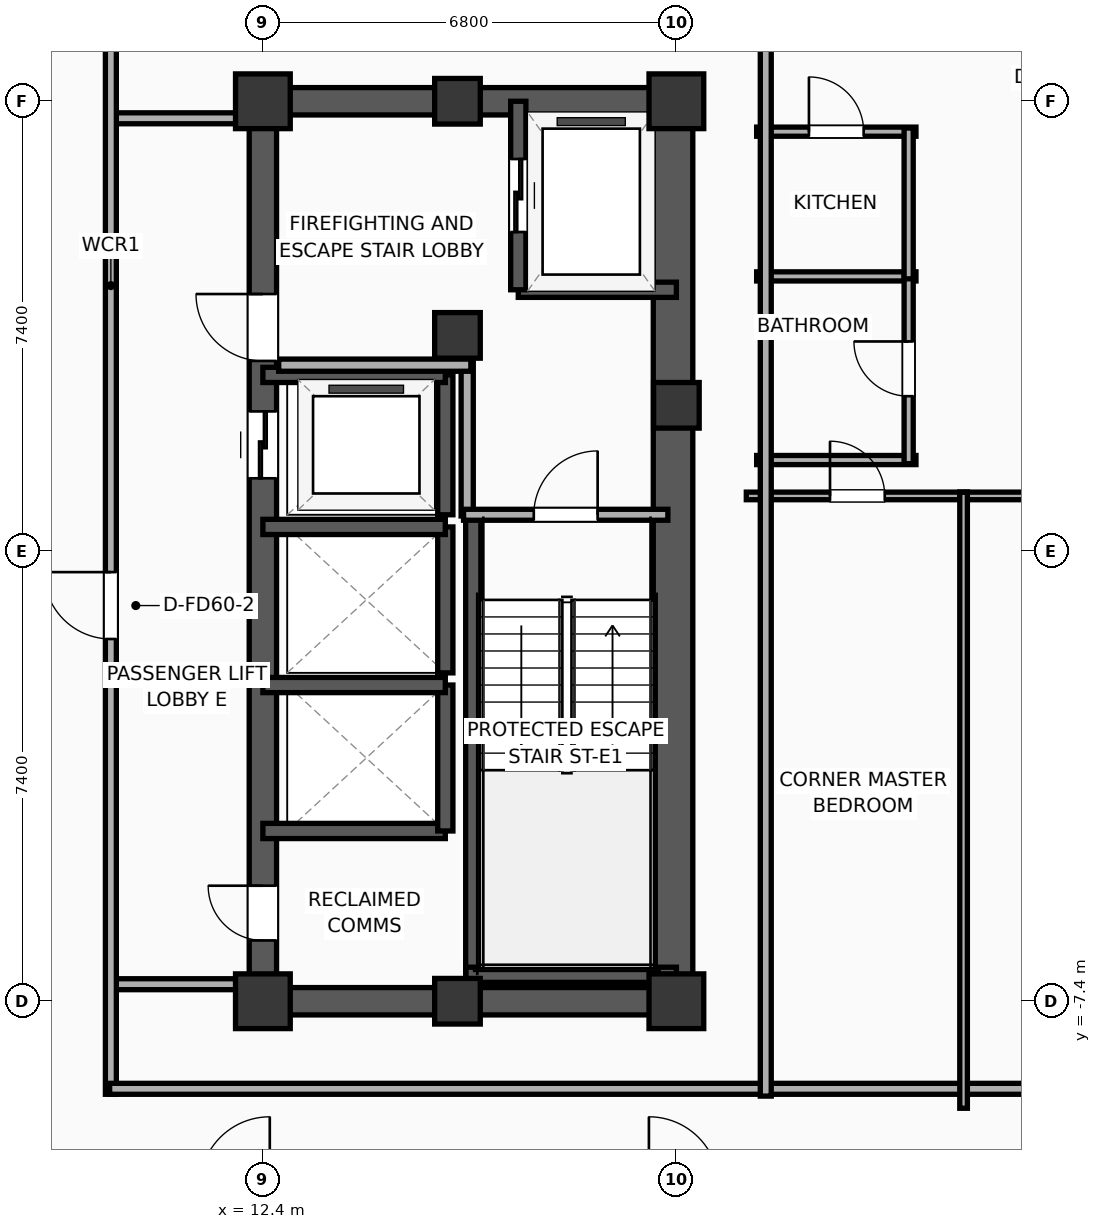
"""IFC4 building model, lengths in metres.
Left out: names, types, materials, properties, quantities, classifications, styles, units other than length and angle.
Written with IfcOpenShell. Run it as: python <this file> out.ifc"""

import sys

from ifc_helpers import new_model, si_unit, direction, frame, frame_2d, origin, origin_2d, place, context, subcontext, project, spatial, rectangle, extrude, element, fill, save


model = new_model("IFC4")
c1 = context("Model", 3, precision=1e-05, world=origin(), true_north=direction((0.0, 1.0)))
c2 = subcontext(c1, "Body", "Model", "MODEL_VIEW")
j1 = project(units=[si_unit("LENGTHUNIT", "METRE"), si_unit("PLANEANGLEUNIT", "RADIAN")], contexts=[c1])
p1 = place(None, origin())
s1 = spatial("IfcSite", under=j1, at=p1, CompositionType="ELEMENT")
p2 = place(p1, origin())
s2 = spatial("IfcBuilding", under=s1, at=p2, CompositionType="ELEMENT")
p3 = place(p2, frame((0.0, 0.0, 204.1)))
s3 = spatial("IfcBuildingStorey", under=s2, at=p3, CompositionType="ELEMENT", Elevation=204.1)
p4 = place(p3, frame((12.4, -7.4, 0.0), z_axis=(0.0, 0.0, 1.0), x_axis=(1.0, 0.0, 0.0)))
e1 = element("IfcColumn", 1, at=p4, inside=s3, PredefinedType="COLUMN", context=c2, shape_type="SweptSolid", body=[
    extrude(rectangle(XDim=0.9, YDim=0.9, at=origin_2d()), origin(), (0.0, 0.0, 1.0), 3.9),
])
p5 = place(p3, frame((15.6, 3.55, 0.0), z_axis=(0.0, 0.0, 1.0), x_axis=(1.0, 0.0, 0.0)))
e2 = element("IfcColumn", 2, at=p5, inside=s3, PredefinedType="COLUMN", context=c2, shape_type="SweptSolid", body=[
    extrude(rectangle(XDim=0.75, YDim=0.75, at=origin_2d()), origin(), (0.0, 0.0, 1.0), 3.9),
])
p6 = place(p3, frame((12.4, 7.4, 0.0), z_axis=(0.0, 0.0, 1.0), x_axis=(1.0, 0.0, 0.0)))
e3 = element("IfcColumn", 3, at=p6, inside=s3, PredefinedType="COLUMN", context=c2, shape_type="SweptSolid", body=[
    extrude(rectangle(XDim=0.9, YDim=0.9, at=origin_2d()), origin(), (0.0, 0.0, 1.0), 3.9),
])
for number, where, z_axis, x_axis in (
    (4, (15.6, -7.4, 0.0), (0.0, 0.0, 1.0), (1.0, 0.0, 0.0)),
    (5, (15.6, 7.4, 0.0), (0.0, 0.0, 1.0), (1.0, 0.0, 0.0)),
):
    element("IfcColumn", number, at=place(p3, frame(where, z_axis=z_axis, x_axis=x_axis)), inside=s3, PredefinedType="COLUMN", context=c2, shape_type="SweptSolid", body=[
        extrude(rectangle(XDim=0.75, YDim=0.75, at=origin_2d()), origin(), (0.0, 0.0, 1.0), 3.9),
    ])
p7 = place(p3, frame((19.2, -7.4, 0.0), z_axis=(0.0, 0.0, 1.0), x_axis=(1.0, 0.0, 0.0)))
e6 = element("IfcColumn", 6, at=p7, inside=s3, PredefinedType="COLUMN", context=c2, shape_type="SweptSolid", body=[
    extrude(rectangle(XDim=0.9, YDim=0.9, at=origin_2d()), origin(), (0.0, 0.0, 1.0), 3.9),
])
p8 = place(p3, frame((19.2, 2.4, 0.0), z_axis=(0.0, 0.0, 1.0), x_axis=(1.0, 0.0, 0.0)))
e7 = element("IfcColumn", 7, at=p8, inside=s3, PredefinedType="COLUMN", context=c2, shape_type="SweptSolid", body=[
    extrude(rectangle(XDim=0.75, YDim=0.75, at=origin_2d()), origin(), (0.0, 0.0, 1.0), 3.9),
])
p9 = place(p3, frame((19.2, 7.4, 0.0), z_axis=(0.0, 0.0, 1.0), x_axis=(1.0, 0.0, 0.0)))
e8 = element("IfcColumn", 8, at=p9, inside=s3, PredefinedType="COLUMN", context=c2, shape_type="SweptSolid", body=[
    extrude(rectangle(XDim=0.9, YDim=0.9, at=origin_2d()), origin(), (0.0, 0.0, 1.0), 3.9),
])
for number, where, z_axis, x_axis in (
    (9, (12.175, -7.4, 0.0), (0.0, 0.0, 1.0), (1.0, 0.0, 0.0)),
    (10, (12.175, 7.4, 0.0), (0.0, 0.0, 1.0), (1.0, 0.0, 0.0)),
):
    element("IfcWall", number, at=place(p3, frame(where, z_axis=z_axis, x_axis=x_axis)), inside=s3, PredefinedType="SHEAR", context=c2, shape_type="SweptSolid", body=[
        extrude(rectangle(XDim=7.25, YDim=0.45, at=frame_2d((3.625, 0.0))), origin(), (0.0, 0.0, 1.0), 3.65),
    ])
p10 = place(p3, frame((12.4, -7.4, 0.0), z_axis=(0.0, 0.0, 1.0), x_axis=(0.0, 1.0, 0.0)))
e11 = element("IfcWall", 11, at=p10, inside=s3, PredefinedType="SHEAR", context=c2, shape_type="SweptSolid", body=[
    extrude(rectangle(XDim=14.8, YDim=0.45, at=frame_2d((7.4, 0.0))), origin(), (0.0, 0.0, 1.0), 3.65),
])
p11 = place(p10, frame((8.6, 0.0, 0.0)))
e12 = element("IfcOpeningElement", 12, at=p11, cuts=e11, PredefinedType="OPENING", context=c2, shape_type="SweptSolid", body=[
    extrude(rectangle(XDim=1.1, YDim=2.05, at=frame_2d((0.55, 1.025))), frame((0.0, 0.235, 0.0), z_axis=(0.0, -1.0, 0.0), x_axis=(1.0, 0.0, 0.0)), (0.0, 0.0, 1.0), 0.47),
])
p12 = place(p10, frame((10.53, 0.0, 0.0)))
e13 = element("IfcOpeningElement", 13, at=p12, cuts=e11, PredefinedType="OPENING", context=c2, shape_type="SweptSolid", body=[
    extrude(rectangle(XDim=1.1, YDim=2.05, at=frame_2d((0.55, 1.025))), frame((0.0, 0.235, 0.0), z_axis=(0.0, -1.0, 0.0), x_axis=(1.0, 0.0, 0.0)), (0.0, 0.0, 1.0), 0.47),
])
p13 = place(p10, frame((1.0, 0.0, 0.0)))
e14 = element("IfcOpeningElement", 14, at=p13, cuts=e11, PredefinedType="OPENING", context=c2, shape_type="SweptSolid", body=[
    extrude(rectangle(XDim=0.9, YDim=2.05, at=frame_2d((0.45, 1.025))), frame((0.0, 0.235, 0.0), z_axis=(0.0, -1.0, 0.0), x_axis=(1.0, 0.0, 0.0)), (0.0, 0.0, 1.0), 0.47),
])
p14 = place(p3, frame((19.145, -7.4, 0.0), z_axis=(0.0, 0.0, 1.0), x_axis=(0.0, 1.0, 0.0)))
e15 = element("IfcWall", 15, at=p14, inside=s3, PredefinedType="SHEAR", context=c2, shape_type="SweptSolid", body=[
    extrude(rectangle(XDim=14.8, YDim=0.65, at=frame_2d((7.4, 0.0))), origin(), (0.0, 0.0, 1.0), 3.65),
])
p15 = place(p3, frame((15.86, -7.085, 0.0), z_axis=(0.0, 0.0, 1.0), x_axis=(0.0, 1.0, 0.0)))
e16 = element("IfcWall", 16, at=p15, inside=s3, PredefinedType="SOLIDWALL", context=c2, shape_type="SweptSolid", body=[
    extrude(rectangle(XDim=7.685, YDim=0.25, at=frame_2d((3.843, 0.0))), origin(), (0.0, 0.0, 1.0), 3.65),
])
p16 = place(p3, frame((15.74, -6.965, 0.0), z_axis=(0.0, 0.0, 1.0), x_axis=(1.0, 0.0, 0.0)))
e17 = element("IfcWall", 17, at=p16, inside=s3, PredefinedType="SOLIDWALL", context=c2, shape_type="SweptSolid", body=[
    extrude(rectangle(XDim=3.46, YDim=0.25, at=frame_2d((1.73, 0.0))), origin(), (0.0, 0.0, 1.0), 3.65),
])
p17 = place(p3, frame((16.6, 4.3, 0.0), z_axis=(0.0, 0.0, 1.0), x_axis=(1.0, 0.0, 0.0)))
e18 = element("IfcWall", 18, at=p17, inside=s3, PredefinedType="SOLIDWALL", context=c2, shape_type="SweptSolid", body=[
    extrude(rectangle(XDim=2.6, YDim=0.25, at=frame_2d((1.3, 0.0))), origin(), (0.0, 0.0, 1.0), 3.65),
])
p18 = place(p3, frame((16.6, 7.4, 0.0), z_axis=(0.0, 0.0, 1.0), x_axis=(0.0, -1.0, 0.0)))
e19 = element("IfcWall", 19, at=p18, inside=s3, PredefinedType="SOLIDWALL", context=c2, shape_type="SweptSolid", body=[
    extrude(rectangle(XDim=3.1, YDim=0.25, at=frame_2d((1.55, 0.0))), origin(), (0.0, 0.0, 1.0), 3.65),
])
p19 = place(p18, frame((0.95, 0.0, 0.0)))
e20 = element("IfcOpeningElement", 20, at=p19, cuts=e19, PredefinedType="OPENING", context=c2, shape_type="SweptSolid", body=[
    extrude(rectangle(XDim=1.2, YDim=2.05, at=frame_2d((0.6, 1.025))), frame((0.0, 0.135, 0.0), z_axis=(0.0, -1.0, 0.0), x_axis=(1.0, 0.0, 0.0)), (0.0, 0.0, 1.0), 0.27),
])
p20 = place(p3, frame((12.4, -4.6, 0.0), z_axis=(0.0, 0.0, 1.0), x_axis=(1.0, 0.0, 0.0)))
e21 = element("IfcWall", 21, at=p20, inside=s3, PredefinedType="SOLIDWALL", context=c2, shape_type="SweptSolid", body=[
    extrude(rectangle(XDim=3.0, YDim=0.25, at=frame_2d((1.5, 0.0))), origin(), (0.0, 0.0, 1.0), 3.65),
])
p21 = place(p3, frame((15.4, -4.6, 0.0), z_axis=(0.0, 0.0, 1.0), x_axis=(0.0, 1.0, 0.0)))
e22 = element("IfcWall", 22, at=p21, inside=s3, PredefinedType="SOLIDWALL", context=c2, shape_type="SweptSolid", body=[
    extrude(rectangle(XDim=2.4, YDim=0.25, at=frame_2d((1.2, 0.0))), origin(), (0.0, 0.0, 1.0), 3.65),
])
p22 = place(p3, frame((15.4, -2.2, 0.0), z_axis=(0.0, 0.0, 1.0), x_axis=(-1.0, 0.0, 0.0)))
e23 = element("IfcWall", 23, at=p22, inside=s3, PredefinedType="SOLIDWALL", context=c2, shape_type="SweptSolid", body=[
    extrude(rectangle(XDim=3.0, YDim=0.25, at=frame_2d((1.5, 0.0))), origin(), (0.0, 0.0, 1.0), 3.65),
])
p23 = place(p3, frame((15.4, -2.0, 0.0), z_axis=(0.0, 0.0, 1.0), x_axis=(0.0, 1.0, 0.0)))
e24 = element("IfcWall", 24, at=p23, inside=s3, PredefinedType="SOLIDWALL", context=c2, shape_type="SweptSolid", body=[
    extrude(rectangle(XDim=2.4, YDim=0.25, at=frame_2d((1.2, 0.0))), origin(), (0.0, 0.0, 1.0), 3.65),
])
p24 = place(p3, frame((15.4, 0.4, 0.0), z_axis=(0.0, 0.0, 1.0), x_axis=(-1.0, 0.0, 0.0)))
e25 = element("IfcWall", 25, at=p24, inside=s3, PredefinedType="SOLIDWALL", context=c2, shape_type="SweptSolid", body=[
    extrude(rectangle(XDim=3.0, YDim=0.25, at=frame_2d((1.5, 0.0))), origin(), (0.0, 0.0, 1.0), 3.65),
])
p25 = place(p3, frame((15.4, 0.6, 0.0), z_axis=(0.0, 0.0, 1.0), x_axis=(0.0, 1.0, 0.0)))
e26 = element("IfcWall", 26, at=p25, inside=s3, PredefinedType="SOLIDWALL", context=c2, shape_type="SweptSolid", body=[
    extrude(rectangle(XDim=2.3, YDim=0.25, at=frame_2d((1.15, 0.0))), origin(), (0.0, 0.0, 1.0), 3.65),
])
p26 = place(p3, frame((15.4, 2.9, 0.0), z_axis=(0.0, 0.0, 1.0), x_axis=(-1.0, 0.0, 0.0)))
e27 = element("IfcWall", 27, at=p26, inside=s3, PredefinedType="SOLIDWALL", context=c2, shape_type="SweptSolid", body=[
    extrude(rectangle(XDim=3.0, YDim=0.25, at=frame_2d((1.5, 0.0))), origin(), (0.0, 0.0, 1.0), 3.65),
])
p27 = place(p3, frame((15.76, 0.58, 0.0), z_axis=(0.0, 0.0, 1.0), x_axis=(0.0, 1.0, 0.0)))
e28 = element("IfcWall", 28, at=p27, inside=s3, PredefinedType="PARTITIONING", context=c2, shape_type="SweptSolid", body=[
    extrude(rectangle(XDim=2.52, YDim=0.2, at=frame_2d((1.26, 0.0))), origin(), (0.0, 0.0, 1.0), 3.65),
])
p28 = place(p3, frame((12.66, 3.06, 0.0), z_axis=(0.0, 0.0, 1.0), x_axis=(1.0, 0.0, 0.0)))
e29 = element("IfcWall", 29, at=p28, inside=s3, PredefinedType="PARTITIONING", context=c2, shape_type="SweptSolid", body=[
    extrude(rectangle(XDim=3.16, YDim=0.2, at=frame_2d((1.58, 0.0))), origin(), (0.0, 0.0, 1.0), 3.65),
])
p29 = place(p3, frame((15.7, 0.6, 0.0), z_axis=(0.0, 0.0, 1.0), x_axis=(1.0, 0.0, 0.0)))
e30 = element("IfcWall", 30, at=p29, inside=s3, PredefinedType="PARTITIONING", context=c2, shape_type="SweptSolid", body=[
    extrude(rectangle(XDim=3.36, YDim=0.18, at=frame_2d((1.68, 0.0))), origin(), (0.0, 0.0, 1.0), 3.65),
])
p30 = place(p29, frame((1.155, 0.0, 0.0)))
e31 = element("IfcOpeningElement", 31, at=p30, cuts=e30, PredefinedType="OPENING", context=c2, shape_type="SweptSolid", body=[
    extrude(rectangle(XDim=1.05, YDim=2.05, at=frame_2d((0.525, 1.025))), frame((0.0, 0.1, 0.0), z_axis=(0.0, -1.0, 0.0), x_axis=(1.0, 0.0, 0.0)), (0.0, 0.0, 1.0), 0.2),
])
for number, where, z_axis, x_axis in (
    (32, (9.88, 7.12, 0.0), (0.0, 0.0, 1.0), (1.0, 0.0, 0.0)),
    (33, (9.88, -7.12, 0.0), (0.0, 0.0, 1.0), (1.0, 0.0, 0.0)),
):
    element("IfcWall", number, at=place(p3, frame(where, z_axis=z_axis, x_axis=x_axis)), inside=s3, PredefinedType="PARTITIONING", context=c2, shape_type="SweptSolid", body=[
        extrude(rectangle(XDim=2.27, YDim=0.18, at=frame_2d((1.135, 0.0))), origin(), (0.0, 0.0, 1.0), 3.65),
    ])
p31 = place(p3, frame((9.9, -8.93, 0.0), z_axis=(0.0, 0.0, 1.0), x_axis=(0.0, 1.0, 0.0)))
e34 = element("IfcWall", 34, at=p31, inside=s3, PredefinedType="PARTITIONING", context=c2, shape_type="SweptSolid", body=[
    extrude(rectangle(XDim=17.86, YDim=0.18, at=frame_2d((8.93, 0.0))), origin(), (0.0, 0.0, 1.0), 3.65),
])
p32 = place(p31, frame((7.487, 0.0, 0.0)))
e35 = element("IfcOpeningElement", 35, at=p32, cuts=e34, PredefinedType="OPENING", context=c2, shape_type="SweptSolid", body=[
    extrude(rectangle(XDim=1.1, YDim=2.05, at=frame_2d((0.55, 1.025))), frame((0.0, 0.1, 0.0), z_axis=(0.0, -1.0, 0.0), x_axis=(1.0, 0.0, 0.0)), (0.0, 0.0, 1.0), 0.2),
])
p33 = place(p3, frame((9.88, -8.84, 0.0), z_axis=(0.0, 0.0, 1.0), x_axis=(1.0, 0.0, 0.0)))
e36 = element("IfcWall", 36, at=p33, inside=s3, PredefinedType="PARTITIONING", context=c2, shape_type="SweptSolid", body=[
    extrude(rectangle(XDim=20.35, YDim=0.18, at=frame_2d((10.175, 0.0))), origin(), (0.0, 0.0, 1.0), 3.65),
])
p34 = place(p3, frame((20.52, 6.9, 0.0), z_axis=(0.0, 0.0, 1.0), x_axis=(1.0, 0.0, 0.0)))
e37 = element("IfcWall", 37, at=p34, inside=s3, PredefinedType="PLUMBINGWALL", context=c2, shape_type="SweptSolid", body=[
    extrude(rectangle(XDim=2.62, YDim=0.15, at=frame_2d((1.31, 0.0))), origin(), (0.0, 0.0, 1.0), 3.65),
])
p35 = place(p34, frame((0.86, 0.0, 0.0)))
e38 = element("IfcOpeningElement", 38, at=p35, cuts=e37, PredefinedType="OPENING", context=c2, shape_type="SweptSolid", body=[
    extrude(rectangle(XDim=0.9, YDim=2.05, at=frame_2d((0.45, 1.025))), frame((0.0, 0.085, 0.0), z_axis=(0.0, -1.0, 0.0), x_axis=(1.0, 0.0, 0.0)), (0.0, 0.0, 1.0), 0.17),
])
for number, where, z_axis, x_axis in (
    (39, (20.52, 4.52, 0.0), (0.0, 0.0, 1.0), (1.0, 0.0, 0.0)),
    (40, (20.52, 1.5, 0.0), (0.0, 0.0, 1.0), (1.0, 0.0, 0.0)),
):
    element("IfcWall", number, at=place(p3, frame(where, z_axis=z_axis, x_axis=x_axis)), inside=s3, PredefinedType="PLUMBINGWALL", context=c2, shape_type="SweptSolid", body=[
        extrude(rectangle(XDim=2.62, YDim=0.15, at=frame_2d((1.31, 0.0))), origin(), (0.0, 0.0, 1.0), 3.65),
    ])
p36 = place(p3, frame((23.02, 1.44, 0.0), z_axis=(0.0, 0.0, 1.0), x_axis=(0.0, 1.0, 0.0)))
e41 = element("IfcWall", 41, at=p36, inside=s3, PredefinedType="PLUMBINGWALL", context=c2, shape_type="SweptSolid", body=[
    extrude(rectangle(XDim=3.12, YDim=0.15, at=frame_2d((1.56, 0.0))), origin(), (0.0, 0.0, 1.0), 3.65),
])
p37 = place(p36, frame((1.11, 0.0, 0.0)))
e42 = element("IfcOpeningElement", 42, at=p37, cuts=e41, PredefinedType="OPENING", context=c2, shape_type="SweptSolid", body=[
    extrude(rectangle(XDim=0.9, YDim=2.05, at=frame_2d((0.45, 1.025))), frame((0.0, 0.085, 0.0), z_axis=(0.0, -1.0, 0.0), x_axis=(1.0, 0.0, 0.0)), (0.0, 0.0, 1.0), 0.17),
])
p38 = place(p3, frame((23.02, 4.48, 0.0), z_axis=(0.0, 0.0, 1.0), x_axis=(0.0, 1.0, 0.0)))
e43 = element("IfcWall", 43, at=p38, inside=s3, PredefinedType="PLUMBINGWALL", context=c2, shape_type="SweptSolid", body=[
    extrude(rectangle(XDim=2.48, YDim=0.15, at=frame_2d((1.24, 0.0))), origin(), (0.0, 0.0, 1.0), 3.65),
])
p39 = place(p3, frame((20.35, 0.91, 0.0), z_axis=(0.0, 0.0, 1.0), x_axis=(1.0, 0.0, 0.0)))
e44 = element("IfcWall", 44, at=p39, inside=s3, PredefinedType="PARTITIONING", context=c2, shape_type="SweptSolid", body=[
    extrude(rectangle(XDim=3.635, YDim=0.125, at=frame_2d((1.818, 0.0))), origin(), (0.0, 0.0, 1.0), 3.65),
])
p40 = place(p39, frame((1.376, 0.0, 0.0)))
e45 = element("IfcOpeningElement", 45, at=p40, cuts=e44, PredefinedType="OPENING", context=c2, shape_type="SweptSolid", body=[
    extrude(rectangle(XDim=0.9, YDim=2.05, at=frame_2d((0.45, 1.025))), frame((0.0, 0.073, 0.0), z_axis=(0.0, -1.0, 0.0), x_axis=(1.0, 0.0, 0.0)), (0.0, 0.0, 1.0), 0.145),
])
p41 = place(p3, frame((23.861, 0.91, 0.0), z_axis=(0.0, 0.0, 1.0), x_axis=(1.0, 0.0, 0.0)))
e46 = element("IfcWall", 46, at=p41, inside=s3, PredefinedType="PARTITIONING", context=c2, shape_type="SweptSolid", body=[
    extrude(rectangle(XDim=3.282, YDim=0.125, at=frame_2d((1.641, 0.0))), origin(), (0.0, 0.0, 1.0), 3.65),
])
p42 = place(p41, frame((1.191, 0.0, 0.0)))
e47 = element("IfcOpeningElement", 47, at=p42, cuts=e46, PredefinedType="OPENING", context=c2, shape_type="SweptSolid", body=[
    extrude(rectangle(XDim=0.9, YDim=2.05, at=frame_2d((0.45, 1.025))), frame((0.0, 0.073, 0.0), z_axis=(0.0, -1.0, 0.0), x_axis=(1.0, 0.0, 0.0)), (0.0, 0.0, 1.0), 0.145),
])
p43 = place(p3, frame((23.923, -9.16, 0.0), z_axis=(0.0, 0.0, 1.0), x_axis=(0.0, 1.0, 0.0)))
e48 = element("IfcWall", 48, at=p43, inside=s3, PredefinedType="PARTITIONING", context=c2, shape_type="SweptSolid", body=[
    extrude(rectangle(XDim=10.13, YDim=0.125, at=frame_2d((5.065, 0.0))), origin(), (0.0, 0.0, 1.0), 3.65),
])
p44 = place(p3, frame((20.67, -8.96, 0.0), z_axis=(0.0, 0.0, 1.0), x_axis=(0.0, 1.0, 0.0)))
e49 = element("IfcWall", 49, at=p44, inside=s3, PredefinedType="PARTITIONING", context=c2, shape_type="SweptSolid", body=[
    extrude(rectangle(XDim=17.92, YDim=0.18, at=frame_2d((8.96, 0.0))), origin(), (0.0, 0.0, 1.0), 3.65),
])
p45 = place(p19, origin())
e50 = element("IfcDoor", 50, at=p45, inside=s3, OperationType="SLIDING_TO_LEFT", PredefinedType="DOOR", context=c2, shape_type="SweptSolid", body=[
    extrude(rectangle(XDim=1.2, YDim=2.05, at=frame_2d((0.6, 1.025))), frame((0.0, 0.025, 0.0), z_axis=(0.0, -1.0, 0.0), x_axis=(1.0, 0.0, 0.0)), (0.0, 0.0, 1.0), 0.05),
])
fill(e20, e50)
p46 = place(p11, origin())
e51 = element("IfcDoor", 51, at=p46, inside=s3, OperationType="SLIDING_TO_LEFT", PredefinedType="DOOR", context=c2, shape_type="SweptSolid", body=[
    extrude(rectangle(XDim=1.1, YDim=2.05, at=frame_2d((0.55, 1.025))), frame((0.0, 0.025, 0.0), z_axis=(0.0, -1.0, 0.0), x_axis=(1.0, 0.0, 0.0)), (0.0, 0.0, 1.0), 0.05),
])
fill(e12, e51)
p47 = place(p30, origin())
e52 = element("IfcDoor", 52, at=p47, inside=s3, OperationType="SINGLE_SWING_RIGHT", PredefinedType="DOOR", context=c2, shape_type="SweptSolid", body=[
    extrude(rectangle(XDim=1.05, YDim=2.05, at=frame_2d((0.525, 1.025))), frame((0.0, 0.025, 0.0), z_axis=(0.0, -1.0, 0.0), x_axis=(1.0, 0.0, 0.0)), (0.0, 0.0, 1.0), 0.05),
])
fill(e31, e52)
p48 = place(p32, origin())
e53 = element("IfcDoor", 53, at=p48, inside=s3, OperationType="SINGLE_SWING_RIGHT", PredefinedType="DOOR", context=c2, shape_type="SweptSolid", body=[
    extrude(rectangle(XDim=1.1, YDim=2.05, at=frame_2d((0.55, 1.025))), frame((0.0, 0.025, 0.0), z_axis=(0.0, -1.0, 0.0), x_axis=(1.0, 0.0, 0.0)), (0.0, 0.0, 1.0), 0.05),
])
fill(e35, e53)
p49 = place(p35, origin())
e54 = element("IfcDoor", 54, at=p49, inside=s3, OperationType="SINGLE_SWING_LEFT", PredefinedType="DOOR", context=c2, shape_type="SweptSolid", body=[
    extrude(rectangle(XDim=0.9, YDim=2.05, at=frame_2d((0.45, 1.025))), frame((0.0, 0.025, 0.0), z_axis=(0.0, -1.0, 0.0), x_axis=(1.0, 0.0, 0.0)), (0.0, 0.0, 1.0), 0.05),
])
fill(e38, e54)
p50 = place(p37, origin())
e55 = element("IfcDoor", 55, at=p50, inside=s3, OperationType="SINGLE_SWING_RIGHT", PredefinedType="DOOR", context=c2, shape_type="SweptSolid", body=[
    extrude(rectangle(XDim=0.9, YDim=2.05, at=frame_2d((0.45, 1.025))), frame((0.0, 0.025, 0.0), z_axis=(0.0, -1.0, 0.0), x_axis=(1.0, 0.0, 0.0)), (0.0, 0.0, 1.0), 0.05),
])
fill(e42, e55)
p51 = place(p40, origin())
e56 = element("IfcDoor", 56, at=p51, inside=s3, OperationType="SINGLE_SWING_LEFT", PredefinedType="DOOR", context=c2, shape_type="SweptSolid", body=[
    extrude(rectangle(XDim=0.9, YDim=2.05, at=frame_2d((0.45, 1.025))), frame((0.0, 0.025, 0.0), z_axis=(0.0, -1.0, 0.0), x_axis=(1.0, 0.0, 0.0)), (0.0, 0.0, 1.0), 0.05),
])
fill(e45, e56)
p52 = place(p12, origin())
e57 = element("IfcDoor", 57, at=p52, inside=s3, OperationType="SINGLE_SWING_RIGHT", PredefinedType="DOOR", context=c2, shape_type="SweptSolid", body=[
    extrude(rectangle(XDim=1.1, YDim=2.05, at=frame_2d((0.55, 1.025))), frame((0.0, 0.025, 0.0), z_axis=(0.0, -1.0, 0.0), x_axis=(1.0, 0.0, 0.0)), (0.0, 0.0, 1.0), 0.05),
])
fill(e13, e57)
p53 = place(p13, origin())
e58 = element("IfcDoor", 58, at=p53, inside=s3, OperationType="SINGLE_SWING_RIGHT", PredefinedType="DOOR", context=c2, shape_type="SweptSolid", body=[
    extrude(rectangle(XDim=0.9, YDim=2.05, at=frame_2d((0.45, 1.025))), frame((0.0, 0.025, 0.0), z_axis=(0.0, -1.0, 0.0), x_axis=(1.0, 0.0, 0.0)), (0.0, 0.0, 1.0), 0.05),
])
fill(e14, e58)
save(model, sys.argv[1])
